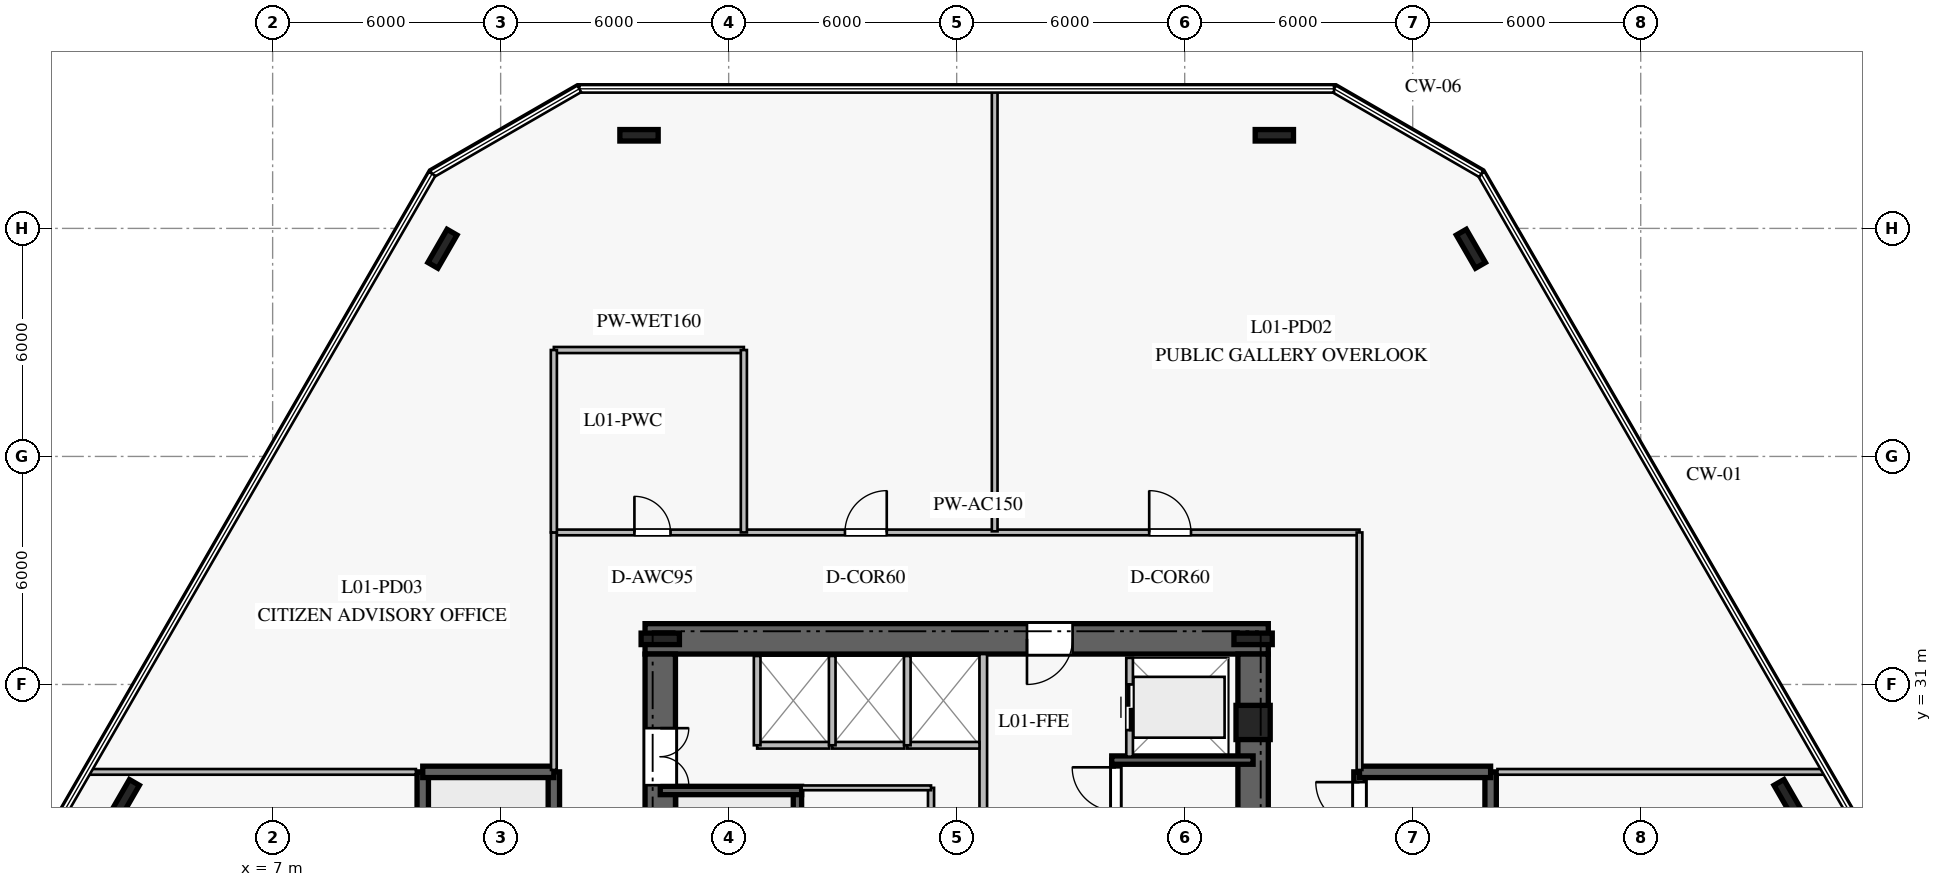
"""IFC4 building model, lengths in metres.
Left out: names, types, materials, properties, quantities, classifications, styles, units other than length and angle.
Written with IfcOpenShell. Run it as: python <this file> out.ifc"""

import sys

from ifc_helpers import new_model, si_unit, direction, frame, frame_2d, origin, origin_2d, place, context, subcontext, project, spatial, rectangle, i_section, extrude, element, fill, save


model = new_model("IFC4")
c1 = context("Model", 3, precision=1e-05, world=origin(), true_north=direction((0.0, 1.0)))
c2 = subcontext(c1, "Body", "Model", "MODEL_VIEW")
j1 = project(units=[si_unit("LENGTHUNIT", "METRE"), si_unit("PLANEANGLEUNIT", "RADIAN")], contexts=[c1])
p1 = place(None, origin())
s1 = spatial("IfcSite", under=j1, at=p1, CompositionType="ELEMENT")
p2 = place(p1, origin())
s2 = spatial("IfcBuilding", under=s1, at=p2, CompositionType="ELEMENT")
p3 = place(p2, frame((0.0, 0.0, 5.2)))
s3 = spatial("IfcBuildingStorey", under=s2, at=p3, CompositionType="ELEMENT", Elevation=5.2)
p4 = place(p3, frame((33.2, 32.2, 0.0), z_axis=(0.0, 0.0, 1.0), x_axis=(-1.0, 0.0, 0.0)))
e1 = element("IfcWall", 1, at=p4, inside=s3, PredefinedType="SHEAR", context=c2, shape_type="SweptSolid", body=[
    extrude(rectangle(XDim=16.4, YDim=0.8, at=frame_2d((8.2, 0.0))), origin(), (0.0, 0.0, 1.0), 4.34),
])
p5 = place(p4, frame((5.15, 0.0, 0.0)))
e2 = element("IfcOpeningElement", 2, at=p5, cuts=e1, PredefinedType="OPENING", context=c2, shape_type="SweptSolid", body=[
    extrude(rectangle(XDim=1.2, YDim=2.25, at=frame_2d((0.6, 1.125))), frame((0.0, 0.41, 0.0), z_axis=(0.0, -1.0, 0.0), x_axis=(1.0, 0.0, 0.0)), (0.0, 0.0, 1.0), 0.82),
])
p6 = place(p3, frame((17.2, 31.8, 0.0), z_axis=(0.0, 0.0, 1.0), x_axis=(0.0, -1.0, 0.0)))
e3 = element("IfcWall", 3, at=p6, inside=s3, PredefinedType="SHEAR", context=c2, shape_type="SweptSolid", body=[
    extrude(rectangle(XDim=13.6, YDim=0.8, at=frame_2d((6.8, 0.0))), origin(), (0.0, 0.0, 1.0), 4.34),
])
p7 = place(p6, frame((1.95, 0.0, 0.0)))
e4 = element("IfcOpeningElement", 4, at=p7, cuts=e3, PredefinedType="OPENING", context=c2, shape_type="SweptSolid", body=[
    extrude(rectangle(XDim=1.5, YDim=2.2, at=frame_2d((0.75, 1.1))), frame((0.0, 0.41, 0.0), z_axis=(0.0, -1.0, 0.0), x_axis=(1.0, 0.0, 0.0)), (0.0, 0.0, 1.0), 0.82),
])
p8 = place(p3, frame((32.8, 18.2, 0.0), z_axis=(0.0, 0.0, 1.0), x_axis=(0.0, 1.0, 0.0)))
e5 = element("IfcWall", 5, at=p8, inside=s3, PredefinedType="SHEAR", context=c2, shape_type="SweptSolid", body=[
    extrude(rectangle(XDim=13.6, YDim=0.8, at=frame_2d((6.8, 0.0))), origin(), (0.0, 0.0, 1.0), 4.34),
])
for number, where, z_axis, x_axis in (
    (6, (32.8, 32.2, 0.0), (0.0, 0.0, 1.0), (1.0, 0.0, 0.0)),
    (7, (17.2, 32.2, 0.0), (0.0, 0.0, 1.0), (1.0, 0.0, 0.0)),
):
    element("IfcColumn", number, at=place(p3, frame(where, z_axis=z_axis, x_axis=x_axis)), inside=s3, PredefinedType="COLUMN", context=c2, shape_type="SweptSolid", body=[
        extrude(i_section(OverallWidth=0.302, OverallDepth=1.008, WebThickness=0.021, FlangeThickness=0.04, at=origin_2d()), origin(), (0.0, 0.0, 1.0), 4.6),
    ])
p9 = place(p3, frame((20.81, 20.99, 0.0), z_axis=(0.0, 0.0, 1.0), x_axis=(0.0, 1.0, 0.0)))
e8 = element("IfcWall", 8, at=p9, inside=s3, PredefinedType="SOLIDWALL", context=c2, shape_type="SweptSolid", body=[
    extrude(rectangle(XDim=7.22, YDim=0.22, at=frame_2d((3.61, 0.0))), origin(), (0.0, 0.0, 1.0), 4.34),
])
p10 = place(p9, frame((0.18, 0.0, 0.0)))
e9 = element("IfcOpeningElement", 9, at=p10, cuts=e8, PredefinedType="OPENING", context=c2, shape_type="SweptSolid", body=[
    extrude(rectangle(XDim=1.15, YDim=2.2, at=frame_2d((0.575, 1.1))), frame((0.0, 0.12, 0.0), z_axis=(0.0, -1.0, 0.0), x_axis=(1.0, 0.0, 0.0)), (0.0, 0.0, 1.0), 0.24),
])
p11 = place(p3, frame((17.2, 28.21, 0.0), z_axis=(0.0, 0.0, 1.0), x_axis=(1.0, 0.0, 0.0)))
e10 = element("IfcWall", 10, at=p11, inside=s3, PredefinedType="SOLIDWALL", context=c2, shape_type="SweptSolid", body=[
    extrude(rectangle(XDim=3.72, YDim=0.22, at=frame_2d((1.86, 0.0))), origin(), (0.0, 0.0, 1.0), 4.34),
])
p12 = place(p3, frame((29.19, 21.79, 0.0), z_axis=(0.0, 0.0, 1.0), x_axis=(0.0, 1.0, 0.0)))
e11 = element("IfcWall", 11, at=p12, inside=s3, PredefinedType="SOLIDWALL", context=c2, shape_type="SweptSolid", body=[
    extrude(rectangle(XDim=7.22, YDim=0.22, at=frame_2d((3.61, 0.0))), origin(), (0.0, 0.0, 1.0), 4.34),
])
p13 = place(p12, frame((5.88, 0.0, 0.0)))
e12 = element("IfcOpeningElement", 12, at=p13, cuts=e11, PredefinedType="OPENING", context=c2, shape_type="SweptSolid", body=[
    extrude(rectangle(XDim=1.15, YDim=2.2, at=frame_2d((0.575, 1.1))), frame((0.0, 0.12, 0.0), z_axis=(0.0, -1.0, 0.0), x_axis=(1.0, 0.0, 0.0)), (0.0, 0.0, 1.0), 0.24),
])
p14 = place(p3, frame((29.08, 29.01, 0.0), z_axis=(0.0, 0.0, 1.0), x_axis=(1.0, 0.0, 0.0)))
e13 = element("IfcWall", 13, at=p14, inside=s3, PredefinedType="SOLIDWALL", context=c2, shape_type="SweptSolid", body=[
    extrude(rectangle(XDim=3.72, YDim=0.22, at=frame_2d((1.86, 0.0))), origin(), (0.0, 0.0, 1.0), 4.34),
])
p15 = place(p3, frame((14.4, 21.3, 0.0), z_axis=(0.0, 0.0, 1.0), x_axis=(0.0, 1.0, 0.0)))
e14 = element("IfcWall", 14, at=p15, inside=s3, PredefinedType="SOLIDWALL", context=c2, shape_type="SweptSolid", body=[
    extrude(rectangle(XDim=7.4, YDim=0.3, at=frame_2d((3.7, 0.0))), origin(), (0.0, 0.0, 1.0), 4.34),
])
p16 = place(p15, frame((0.22, 0.0, 0.0)))
e15 = element("IfcOpeningElement", 15, at=p16, cuts=e14, PredefinedType="OPENING", context=c2, shape_type="SweptSolid", body=[
    extrude(rectangle(XDim=1.15, YDim=2.2, at=frame_2d((0.575, 1.1))), frame((0.0, 0.16, 0.0), z_axis=(0.0, -1.0, 0.0), x_axis=(1.0, 0.0, 0.0)), (0.0, 0.0, 1.0), 0.32),
])
p17 = place(p3, frame((10.95, 21.3, 0.0), z_axis=(0.0, 0.0, 1.0), x_axis=(0.0, 1.0, 0.0)))
e16 = element("IfcWall", 16, at=p17, inside=s3, PredefinedType="SOLIDWALL", context=c2, shape_type="SweptSolid", body=[
    extrude(rectangle(XDim=7.4, YDim=0.3, at=frame_2d((3.7, 0.0))), origin(), (0.0, 0.0, 1.0), 4.34),
])
p18 = place(p3, frame((10.95, 28.7, 0.0), z_axis=(0.0, 0.0, 1.0), x_axis=(1.0, 0.0, 0.0)))
e17 = element("IfcWall", 17, at=p18, inside=s3, PredefinedType="SOLIDWALL", context=c2, shape_type="SweptSolid", body=[
    extrude(rectangle(XDim=3.45, YDim=0.3, at=frame_2d((1.725, 0.0))), origin(), (0.0, 0.0, 1.0), 4.34),
])
p19 = place(p3, frame((35.6, 21.3, 0.0), z_axis=(0.0, 0.0, 1.0), x_axis=(0.0, 1.0, 0.0)))
e18 = element("IfcWall", 18, at=p19, inside=s3, PredefinedType="SOLIDWALL", context=c2, shape_type="SweptSolid", body=[
    extrude(rectangle(XDim=7.4, YDim=0.3, at=frame_2d((3.7, 0.0))), origin(), (0.0, 0.0, 1.0), 4.34),
])
p20 = place(p19, frame((5.98, 0.0, 0.0)))
e19 = element("IfcOpeningElement", 19, at=p20, cuts=e18, PredefinedType="OPENING", context=c2, shape_type="SweptSolid", body=[
    extrude(rectangle(XDim=1.15, YDim=2.2, at=frame_2d((0.575, 1.1))), frame((0.0, 0.16, 0.0), z_axis=(0.0, -1.0, 0.0), x_axis=(1.0, 0.0, 0.0)), (0.0, 0.0, 1.0), 0.32),
])
p21 = place(p3, frame((39.05, 21.3, 0.0), z_axis=(0.0, 0.0, 1.0), x_axis=(0.0, 1.0, 0.0)))
e20 = element("IfcWall", 20, at=p21, inside=s3, PredefinedType="SOLIDWALL", context=c2, shape_type="SweptSolid", body=[
    extrude(rectangle(XDim=7.4, YDim=0.3, at=frame_2d((3.7, 0.0))), origin(), (0.0, 0.0, 1.0), 4.34),
])
p22 = place(p3, frame((35.6, 28.7, 0.0), z_axis=(0.0, 0.0, 1.0), x_axis=(1.0, 0.0, 0.0)))
e21 = element("IfcWall", 21, at=p22, inside=s3, PredefinedType="SOLIDWALL", context=c2, shape_type="SweptSolid", body=[
    extrude(rectangle(XDim=3.45, YDim=0.3, at=frame_2d((1.725, 0.0))), origin(), (0.0, 0.0, 1.0), 4.34),
])
for number, where, z_axis, x_axis in (
    (22, (46.89, 27.986, 0.0), (0.0, 0.0, 1.0), (-0.5, 0.866, 0.0)),
    (23, (38.531, 42.464, 0.0), (0.0, 0.0, 1.0), (-0.5, 0.866, 0.0)),
    (24, (33.359, 45.45, 0.0), (0.0, 0.0, 1.0), (1.0, 0.0, 0.0)),
    (25, (16.641, 45.45, 0.0), (0.0, 0.0, 1.0), (1.0, 0.0, 0.0)),
    (26, (11.469, 42.464, 0.0), (0.0, 0.0, 1.0), (0.5, 0.866, 0.0)),
    (27, (3.11, 27.986, 0.0), (0.0, 0.0, 1.0), (0.5, 0.866, 0.0)),
):
    element("IfcColumn", number, at=place(p3, frame(where, z_axis=z_axis, x_axis=x_axis)), inside=s3, PredefinedType="COLUMN", context=c2, shape_type="SweptSolid", body=[
        extrude(i_section(OverallWidth=0.302, OverallDepth=1.008, WebThickness=0.021, FlangeThickness=0.04, at=origin_2d()), origin(), (0.0, 0.0, 1.0), 4.6),
    ])
p23 = place(p3, frame((32.8, 30.0, 0.0), z_axis=(0.0, 0.0, 1.0), x_axis=(1.0, 0.0, 0.0)))
e28 = element("IfcColumn", 28, at=p23, inside=s3, PredefinedType="PILASTER", context=c2, shape_type="SweptSolid", body=[
    extrude(rectangle(XDim=0.9, YDim=0.9, at=origin_2d()), origin(), (0.0, 0.0, 1.0), 4.6),
])
p24 = place(p3, frame((25.7, 26.65, 0.0), z_axis=(0.0, 0.0, 1.0), x_axis=(0.0, 1.0, 0.0)))
e29 = element("IfcWall", 29, at=p24, inside=s3, PredefinedType="PARTITIONING", context=c2, shape_type="SweptSolid", body=[
    extrude(rectangle(XDim=5.15, YDim=0.2, at=frame_2d((2.575, 0.0))), origin(), (0.0, 0.0, 1.0), 4.34),
])
p25 = place(p3, frame((24.325, 23.35, 0.0), z_axis=(0.0, 0.0, 1.0), x_axis=(0.0, 1.0, 0.0)))
e30 = element("IfcWall", 30, at=p25, inside=s3, PredefinedType="PLUMBINGWALL", context=c2, shape_type="SweptSolid", body=[
    extrude(rectangle(XDim=4.93, YDim=0.16, at=frame_2d((2.465, 0.0))), origin(), (0.0, 0.0, 1.0), 4.34),
])
p26 = place(p25, frame((0.8, 0.0, 0.0)))
e31 = element("IfcOpeningElement", 31, at=p26, cuts=e30, PredefinedType="OPENING", context=c2, shape_type="SweptSolid", body=[
    extrude(rectangle(XDim=0.95, YDim=2.1, at=frame_2d((0.475, 1.05))), frame((0.0, 0.09, 0.0), z_axis=(0.0, -1.0, 0.0), x_axis=(1.0, 0.0, 0.0)), (0.0, 0.0, 1.0), 0.18),
])
p27 = place(p25, frame((3.26, 0.0, 0.0)))
e32 = element("IfcOpeningElement", 32, at=p27, cuts=e30, PredefinedType="OPENING", context=c2, shape_type="SweptSolid", body=[
    extrude(rectangle(XDim=0.9, YDim=2.1, at=frame_2d((0.45, 1.05))), frame((0.0, 0.09, 0.0), z_axis=(0.0, -1.0, 0.0), x_axis=(1.0, 0.0, 0.0)), (0.0, 0.0, 1.0), 0.18),
])
p28 = place(p3, frame((20.92, 28.28, 0.0), z_axis=(0.0, 0.0, 1.0), x_axis=(1.0, 0.0, 0.0)))
e33 = element("IfcWall", 33, at=p28, inside=s3, PredefinedType="PARTITIONING", context=c2, shape_type="SweptSolid", body=[
    extrude(rectangle(XDim=3.405, YDim=0.125, at=frame_2d((1.703, 0.0))), origin(), (0.0, 0.0, 1.0), 4.34),
])
p29 = place(p3, frame((19.75, 29.4, 0.0), z_axis=(0.0, 0.0, 1.0), x_axis=(1.0, 0.0, 0.0)))
e34 = element("IfcWall", 34, at=p29, inside=s3, PredefinedType="PARTITIONING", context=c2, shape_type="SweptSolid", body=[
    extrude(rectangle(XDim=1.9, YDim=0.175, at=frame_2d((0.95, 0.0))), origin(), (0.0, 0.0, 1.0), 4.34),
])
p30 = place(p3, frame((19.75, 29.4, 0.0), z_axis=(0.0, 0.0, 1.0), x_axis=(0.0, 1.0, 0.0)))
e35 = element("IfcWall", 35, at=p30, inside=s3, PredefinedType="PARTITIONING", context=c2, shape_type="SweptSolid", body=[
    extrude(rectangle(XDim=2.35, YDim=0.175, at=frame_2d((1.175, 0.0))), origin(), (0.0, 0.0, 1.0), 4.34),
])
p31 = place(p3, frame((21.725, 29.4, 0.0), z_axis=(0.0, 0.0, 1.0), x_axis=(1.0, 0.0, 0.0)))
e36 = element("IfcWall", 36, at=p31, inside=s3, PredefinedType="PARTITIONING", context=c2, shape_type="SweptSolid", body=[
    extrude(rectangle(XDim=1.9, YDim=0.175, at=frame_2d((0.95, 0.0))), origin(), (0.0, 0.0, 1.0), 4.34),
])
p32 = place(p3, frame((21.725, 29.4, 0.0), z_axis=(0.0, 0.0, 1.0), x_axis=(0.0, 1.0, 0.0)))
e37 = element("IfcWall", 37, at=p32, inside=s3, PredefinedType="PARTITIONING", context=c2, shape_type="SweptSolid", body=[
    extrude(rectangle(XDim=2.35, YDim=0.175, at=frame_2d((1.175, 0.0))), origin(), (0.0, 0.0, 1.0), 4.34),
])
p33 = place(p3, frame((23.7, 29.4, 0.0), z_axis=(0.0, 0.0, 1.0), x_axis=(1.0, 0.0, 0.0)))
e38 = element("IfcWall", 38, at=p33, inside=s3, PredefinedType="PARTITIONING", context=c2, shape_type="SweptSolid", body=[
    extrude(rectangle(XDim=1.9, YDim=0.175, at=frame_2d((0.95, 0.0))), origin(), (0.0, 0.0, 1.0), 4.34),
])
p34 = place(p3, frame((23.7, 29.4, 0.0), z_axis=(0.0, 0.0, 1.0), x_axis=(0.0, 1.0, 0.0)))
e39 = element("IfcWall", 39, at=p34, inside=s3, PredefinedType="PARTITIONING", context=c2, shape_type="SweptSolid", body=[
    extrude(rectangle(XDim=2.35, YDim=0.175, at=frame_2d((1.175, 0.0))), origin(), (0.0, 0.0, 1.0), 4.34),
])
p35 = place(p3, frame((29.55, 29.1, 0.0), z_axis=(0.0, 0.0, 1.0), x_axis=(0.0, 1.0, 0.0)))
e40 = element("IfcWall", 40, at=p35, inside=s3, PredefinedType="PARTITIONING", context=c2, shape_type="SweptSolid", body=[
    extrude(rectangle(XDim=2.6, YDim=0.175, at=frame_2d((1.3, 0.0))), origin(), (0.0, 0.0, 1.0), 4.34),
])
p36 = place(p35, frame((0.7, 0.0, 0.0)))
e41 = element("IfcOpeningElement", 41, at=p36, cuts=e40, PredefinedType="OPENING", context=c2, shape_type="SweptSolid", body=[
    extrude(rectangle(XDim=1.2, YDim=2.2, at=frame_2d((0.6, 1.1))), frame((0.0, 0.098, 0.0), z_axis=(0.0, -1.0, 0.0), x_axis=(1.0, 0.0, 0.0)), (0.0, 0.0, 1.0), 0.195),
])
p37 = place(p3, frame((14.4, 35.0, 0.0), z_axis=(0.0, 0.0, 1.0), x_axis=(1.0, 0.0, 0.0)))
e42 = element("IfcWall", 42, at=p37, inside=s3, PredefinedType="PARTITIONING", context=c2, shape_type="SweptSolid", body=[
    extrude(rectangle(XDim=21.2, YDim=0.15, at=frame_2d((10.6, 0.0))), origin(), (0.0, 0.0, 1.0), 3.79),
])
p38 = place(p37, frame((2.12, 0.0, 0.0)))
e43 = element("IfcOpeningElement", 43, at=p38, cuts=e42, PredefinedType="OPENING", context=c2, shape_type="SweptSolid", body=[
    extrude(rectangle(XDim=0.95, YDim=2.1, at=frame_2d((0.475, 1.05))), frame((0.0, 0.085, 0.0), z_axis=(0.0, -1.0, 0.0), x_axis=(1.0, 0.0, 0.0)), (0.0, 0.0, 1.0), 0.17),
])
p39 = place(p37, frame((15.666, 0.0, 0.0)))
e44 = element("IfcOpeningElement", 44, at=p39, cuts=e42, PredefinedType="OPENING", context=c2, shape_type="SweptSolid", body=[
    extrude(rectangle(XDim=1.1, YDim=2.2, at=frame_2d((0.55, 1.1))), frame((0.0, 0.085, 0.0), z_axis=(0.0, -1.0, 0.0), x_axis=(1.0, 0.0, 0.0)), (0.0, 0.0, 1.0), 0.17),
])
p40 = place(p37, frame((7.66, 0.0, 0.0)))
e45 = element("IfcOpeningElement", 45, at=p40, cuts=e42, PredefinedType="OPENING", context=c2, shape_type="SweptSolid", body=[
    extrude(rectangle(XDim=1.1, YDim=2.2, at=frame_2d((0.55, 1.1))), frame((0.0, 0.085, 0.0), z_axis=(0.0, -1.0, 0.0), x_axis=(1.0, 0.0, 0.0)), (0.0, 0.0, 1.0), 0.17),
])
p41 = place(p3, frame((14.4, 28.75, 0.0), z_axis=(0.0, 0.0, 1.0), x_axis=(0.0, 1.0, 0.0)))
e46 = element("IfcWall", 46, at=p41, inside=s3, PredefinedType="PARTITIONING", context=c2, shape_type="SweptSolid", body=[
    extrude(rectangle(XDim=6.25, YDim=0.15, at=frame_2d((3.125, 0.0))), origin(), (0.0, 0.0, 1.0), 4.34),
])
p42 = place(p3, frame((35.6, 28.75, 0.0), z_axis=(0.0, 0.0, 1.0), x_axis=(0.0, 1.0, 0.0)))
e47 = element("IfcWall", 47, at=p42, inside=s3, PredefinedType="PARTITIONING", context=c2, shape_type="SweptSolid", body=[
    extrude(rectangle(XDim=6.25, YDim=0.15, at=frame_2d((3.125, 0.0))), origin(), (0.0, 0.0, 1.0), 3.79),
])
p43 = place(p3, frame((14.4, 39.8, 0.0), z_axis=(0.0, 0.0, 1.0), x_axis=(1.0, 0.0, 0.0)))
e48 = element("IfcWall", 48, at=p43, inside=s3, PredefinedType="PLUMBINGWALL", context=c2, shape_type="SweptSolid", body=[
    extrude(rectangle(XDim=5.0, YDim=0.16, at=frame_2d((2.5, 0.0))), origin(), (0.0, 0.0, 1.0), 3.79),
])
p44 = place(p3, frame((19.4, 35.0, 0.0), z_axis=(0.0, 0.0, 1.0), x_axis=(0.0, 1.0, 0.0)))
e49 = element("IfcWall", 49, at=p44, inside=s3, PredefinedType="PLUMBINGWALL", context=c2, shape_type="SweptSolid", body=[
    extrude(rectangle(XDim=4.8, YDim=0.16, at=frame_2d((2.4, 0.0))), origin(), (0.0, 0.0, 1.0), 4.34),
])
p45 = place(p3, frame((14.4, 35.0, 0.0), z_axis=(0.0, 0.0, 1.0), x_axis=(0.0, 1.0, 0.0)))
e50 = element("IfcWall", 50, at=p45, inside=s3, PredefinedType="PLUMBINGWALL", context=c2, shape_type="SweptSolid", body=[
    extrude(rectangle(XDim=4.8, YDim=0.16, at=frame_2d((2.4, 0.0))), origin(), (0.0, 0.0, 1.0), 3.79),
])
for number, where, z_axis, x_axis in (
    (51, (2.08, 28.7, 0.0), (0.0, 0.0, 1.0), (1.0, 0.0, 0.0)),
    (52, (39.23, 28.7, 0.0), (0.0, 0.0, 1.0), (1.0, 0.0, 0.0)),
):
    element("IfcWall", number, at=place(p3, frame(where, z_axis=z_axis, x_axis=x_axis)), inside=s3, PredefinedType="PARTITIONING", context=c2, shape_type="SweptSolid", body=[
        extrude(rectangle(XDim=8.69, YDim=0.15, at=frame_2d((4.345, 0.0))), origin(), (0.0, 0.0, 1.0), 3.64),
    ])
p46 = place(p3, frame((26.0, 35.03, 0.0), z_axis=(0.0, 0.0, 1.0), x_axis=(0.0, 1.0, 0.0)))
e53 = element("IfcWall", 53, at=p46, inside=s3, PredefinedType="PARTITIONING", context=c2, shape_type="SweptSolid", body=[
    extrude(rectangle(XDim=11.67, YDim=0.15, at=frame_2d((5.835, 0.0))), origin(), (0.0, 0.0, 1.0), 3.64),
])
p47 = place(p13, origin())
e54 = element("IfcDoor", 54, at=p47, inside=s3, OperationType="SINGLE_SWING_RIGHT", PredefinedType="DOOR", context=c2, shape_type="SweptSolid", body=[
    extrude(rectangle(XDim=1.15, YDim=2.2, at=frame_2d((0.575, 1.1))), frame((0.0, 0.025, 0.0), z_axis=(0.0, -1.0, 0.0), x_axis=(1.0, 0.0, 0.0)), (0.0, 0.0, 1.0), 0.05),
])
fill(e12, e54)
p48 = place(p5, origin())
e55 = element("IfcDoor", 55, at=p48, inside=s3, OperationType="SINGLE_SWING_RIGHT", PredefinedType="DOOR", context=c2, shape_type="SweptSolid", body=[
    extrude(rectangle(XDim=1.2, YDim=2.25, at=frame_2d((0.6, 1.125))), frame((0.0, 0.025, 0.0), z_axis=(0.0, -1.0, 0.0), x_axis=(1.0, 0.0, 0.0)), (0.0, 0.0, 1.0), 0.05),
])
fill(e2, e55)
p49 = place(p7, origin())
e56 = element("IfcDoor", 56, at=p49, inside=s3, OperationType="DOUBLE_DOOR_SINGLE_SWING", PredefinedType="DOOR", context=c2, shape_type="SweptSolid", body=[
    extrude(rectangle(XDim=1.5, YDim=2.2, at=frame_2d((0.75, 1.1))), frame((0.0, 0.025, 0.0), z_axis=(0.0, -1.0, 0.0), x_axis=(1.0, 0.0, 0.0)), (0.0, 0.0, 1.0), 0.05),
])
fill(e4, e56)
p50 = place(p36, origin())
e57 = element("IfcDoor", 57, at=p50, inside=s3, OperationType="DOUBLE_DOOR_SLIDING", PredefinedType="DOOR", context=c2, shape_type="SweptSolid", body=[
    extrude(rectangle(XDim=1.2, YDim=2.2, at=frame_2d((0.6, 1.1))), frame((0.0, 0.025, 0.0), z_axis=(0.0, -1.0, 0.0), x_axis=(1.0, 0.0, 0.0)), (0.0, 0.0, 1.0), 0.05),
])
fill(e41, e57)
p51 = place(p20, origin())
e58 = element("IfcDoor", 58, at=p51, inside=s3, OperationType="SINGLE_SWING_RIGHT", PredefinedType="DOOR", context=c2, shape_type="SweptSolid", body=[
    extrude(rectangle(XDim=1.15, YDim=2.2, at=frame_2d((0.575, 1.1))), frame((0.0, 0.025, 0.0), z_axis=(0.0, -1.0, 0.0), x_axis=(1.0, 0.0, 0.0)), (0.0, 0.0, 1.0), 0.05),
])
fill(e19, e58)
p52 = place(p38, origin())
e59 = element("IfcDoor", 59, at=p52, inside=s3, OperationType="SINGLE_SWING_LEFT", PredefinedType="DOOR", context=c2, shape_type="SweptSolid", body=[
    extrude(rectangle(XDim=0.95, YDim=2.1, at=frame_2d((0.475, 1.05))), frame((0.0, 0.025, 0.0), z_axis=(0.0, -1.0, 0.0), x_axis=(1.0, 0.0, 0.0)), (0.0, 0.0, 1.0), 0.05),
])
fill(e43, e59)
p53 = place(p39, origin())
e60 = element("IfcDoor", 60, at=p53, inside=s3, OperationType="SINGLE_SWING_LEFT", PredefinedType="DOOR", context=c2, shape_type="SweptSolid", body=[
    extrude(rectangle(XDim=1.1, YDim=2.2, at=frame_2d((0.55, 1.1))), frame((0.0, 0.025, 0.0), z_axis=(0.0, -1.0, 0.0), x_axis=(1.0, 0.0, 0.0)), (0.0, 0.0, 1.0), 0.05),
])
fill(e44, e60)
p54 = place(p40, origin())
e61 = element("IfcDoor", 61, at=p54, inside=s3, OperationType="SINGLE_SWING_RIGHT", PredefinedType="DOOR", context=c2, shape_type="SweptSolid", body=[
    extrude(rectangle(XDim=1.1, YDim=2.2, at=frame_2d((0.55, 1.1))), frame((0.0, 0.025, 0.0), z_axis=(0.0, -1.0, 0.0), x_axis=(1.0, 0.0, 0.0)), (0.0, 0.0, 1.0), 0.05),
])
fill(e45, e61)
save(model, sys.argv[1])
